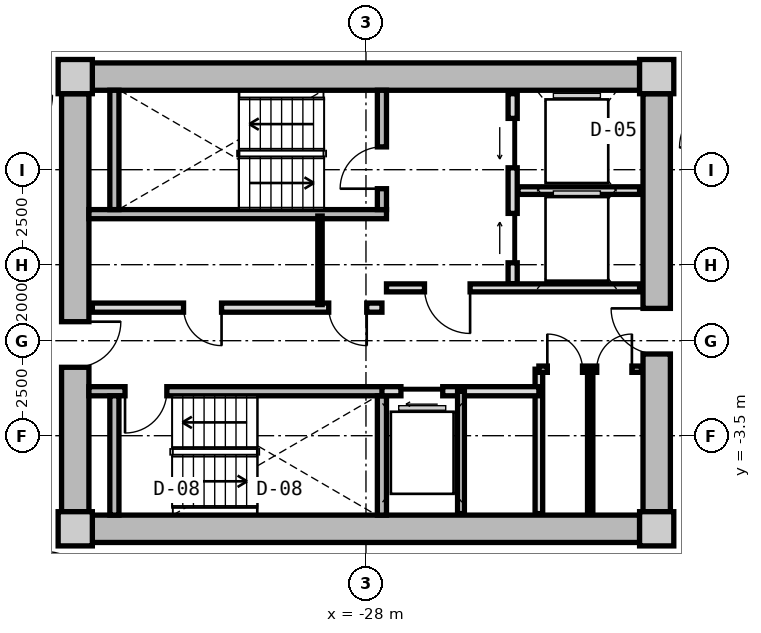
"""IFC4 building model, lengths in metres.
Left out: names, types, materials, properties, quantities, classifications, styles, units other than length and angle.
Written with IfcOpenShell. Run it as: python <this file> out.ifc"""

import sys

from ifc_helpers import new_model, si_unit, direction, frame, frame_2d, origin, origin_2d, place, context, subcontext, project, spatial, rectangle, extrude, source, transform, mapped, element, fill, save


model = new_model("IFC4")
c1 = context("Model", 3, precision=1e-05, world=origin(), true_north=direction((0.0, 1.0)))
c2 = subcontext(c1, "Body", "Model", "MODEL_VIEW")
j1 = project(units=[si_unit("LENGTHUNIT", "METRE"), si_unit("PLANEANGLEUNIT", "RADIAN")], contexts=[c1])
p1 = place(None, origin())
s1 = spatial("IfcSite", under=j1, at=p1, CompositionType="ELEMENT")
p2 = place(p1, origin())
s2 = spatial("IfcBuilding", under=s1, at=p2, CompositionType="ELEMENT")
p3 = place(p2, frame((0.0, 0.0, 105.4)))
s3 = spatial("IfcBuildingStorey", under=s2, at=p3, CompositionType="ELEMENT", Elevation=105.4)
m1 = source(origin(), c2, "Body", "SweptSolid", [
    extrude(rectangle(XDim=0.9, YDim=0.9, at=origin_2d()), origin(), (0.0, 0.0, 1.0), 3.05),
])
for number, where, z_axis, x_axis in (
    (1, (-35.65, -5.95, 0.0), (0.0, 0.0, 1.0), (1.0, 0.0, 0.0)),
    (2, (-20.35, -5.95, 0.0), (0.0, 0.0, 1.0), (1.0, 0.0, 0.0)),
    (3, (-20.35, 5.95, 0.0), (0.0, 0.0, 1.0), (1.0, 0.0, 0.0)),
    (4, (-35.65, 5.95, 0.0), (0.0, 0.0, 1.0), (1.0, 0.0, 0.0)),
):
    element("IfcColumn", number, at=place(p3, frame(where, z_axis=z_axis, x_axis=x_axis)), inside=s3, PredefinedType="COLUMN", context=c2, shape_type="MappedRepresentation", body=[
        mapped(m1, transform((0.0, 0.0, 0.0), x_axis=(1.0, 0.0, 0.0), y_axis=(0.0, 1.0, 0.0), z_axis=(0.0, 0.0, 1.0), scale=1.0)),
    ])
m2 = source(origin(), c2, "Body", "SweptSolid", [
    extrude(rectangle(XDim=14.4, YDim=0.72, at=frame_2d((7.2, 0.0))), origin(), (0.0, 0.0, 1.0), 2.79),
])
for number, where, z_axis, x_axis in (
    (5, (-35.2, 5.95, 0.0), (0.0, 0.0, 1.0), (1.0, 0.0, 0.0)),
    (6, (-20.8, -5.95, 0.0), (0.0, 0.0, 1.0), (-1.0, 0.0, 0.0)),
):
    element("IfcWall", number, at=place(p3, frame(where, z_axis=z_axis, x_axis=x_axis)), inside=s3, PredefinedType="SHEAR", context=c2, shape_type="MappedRepresentation", body=[
        mapped(m2, transform((0.0, 0.0, 0.0), x_axis=(1.0, 0.0, 0.0), y_axis=(0.0, 1.0, 0.0), z_axis=(0.0, 0.0, 1.0), scale=1.0)),
    ])
m3 = source(origin(), c2, "Body", "SweptSolid", [
    extrude(rectangle(XDim=11.0, YDim=0.72, at=frame_2d((5.5, 0.0))), origin(), (0.0, 0.0, 1.0), 2.79),
])
p4 = place(p3, frame((-35.65, -5.5, 0.0), z_axis=(0.0, 0.0, 1.0), x_axis=(0.0, 1.0, 0.0)))
e7 = element("IfcWall", 7, at=p4, inside=s3, PredefinedType="SHEAR", context=c2, shape_type="MappedRepresentation", body=[
    mapped(m3, transform((0.0, 0.0, 0.0), x_axis=(1.0, 0.0, 0.0), y_axis=(0.0, 1.0, 0.0), z_axis=(0.0, 0.0, 1.0), scale=1.0)),
])
p5 = place(p4, frame((3.8, 0.0, 0.0)))
e8 = element("IfcOpeningElement", 8, at=p5, cuts=e7, PredefinedType="OPENING", context=c2, shape_type="SweptSolid", body=[
    extrude(rectangle(XDim=1.2, YDim=2.15, at=frame_2d((0.6, 1.075))), frame((0.0, 0.37, 0.0), z_axis=(0.0, -1.0, 0.0), x_axis=(1.0, 0.0, 0.0)), (0.0, 0.0, 1.0), 0.74),
])
p6 = place(p3, frame((-20.35, 5.5, 0.0), z_axis=(0.0, 0.0, 1.0), x_axis=(0.0, -1.0, 0.0)))
e9 = element("IfcWall", 9, at=p6, inside=s3, PredefinedType="SHEAR", context=c2, shape_type="MappedRepresentation", body=[
    mapped(m3, transform((0.0, 0.0, 0.0), x_axis=(1.0, 0.0, 0.0), y_axis=(0.0, 1.0, 0.0), z_axis=(0.0, 0.0, 1.0), scale=1.0)),
])
p7 = place(p6, frame((5.65, 0.0, 0.0)))
e10 = element("IfcOpeningElement", 10, at=p7, cuts=e9, PredefinedType="OPENING", context=c2, shape_type="SweptSolid", body=[
    extrude(rectangle(XDim=1.2, YDim=2.15, at=frame_2d((0.6, 1.075))), frame((0.0, 0.37, 0.0), z_axis=(0.0, -1.0, 0.0), x_axis=(1.0, 0.0, 0.0)), (0.0, 0.0, 1.0), 0.74),
])
m4 = source(origin(), c2, "Body", "SweptSolid", [
    extrude(rectangle(XDim=7.83, YDim=0.24, at=frame_2d((3.915, 0.0))), origin(), (0.0, 0.0, 1.0), 2.79),
])
p8 = place(p3, frame((-35.29, 2.33, 0.0), z_axis=(0.0, 0.0, 1.0), x_axis=(1.0, 0.0, 0.0)))
e11 = element("IfcWall", 11, at=p8, inside=s3, PredefinedType="PARTITIONING", context=c2, shape_type="MappedRepresentation", body=[
    mapped(m4, transform((0.0, 0.0, 0.0), x_axis=(1.0, 0.0, 0.0), y_axis=(0.0, 1.0, 0.0), z_axis=(0.0, 0.0, 1.0), scale=1.0)),
])
m5 = source(origin(), c2, "Body", "SweptSolid", [
    extrude(rectangle(XDim=3.14, YDim=0.24, at=frame_2d((1.57, 0.0))), origin(), (0.0, 0.0, 1.0), 2.79),
])
p9 = place(p3, frame((-34.62, 2.45, 0.0), z_axis=(0.0, 0.0, 1.0), x_axis=(0.0, 1.0, 0.0)))
e12 = element("IfcWall", 12, at=p9, inside=s3, PredefinedType="PARTITIONING", context=c2, shape_type="MappedRepresentation", body=[
    mapped(m5, transform((0.0, 0.0, 0.0), x_axis=(1.0, 0.0, 0.0), y_axis=(0.0, 1.0, 0.0), z_axis=(0.0, 0.0, 1.0), scale=1.0)),
])
p10 = place(p3, frame((-27.58, 2.45, 0.0), z_axis=(0.0, 0.0, 1.0), x_axis=(0.0, 1.0, 0.0)))
e13 = element("IfcWall", 13, at=p10, inside=s3, PredefinedType="PARTITIONING", context=c2, shape_type="MappedRepresentation", body=[
    mapped(m5, transform((0.0, 0.0, 0.0), x_axis=(1.0, 0.0, 0.0), y_axis=(0.0, 1.0, 0.0), z_axis=(0.0, 0.0, 1.0), scale=1.0)),
])
p11 = place(p10, frame((0.55, 0.0, 0.0)))
e14 = element("IfcOpeningElement", 14, at=p11, cuts=e13, PredefinedType="OPENING", context=c2, shape_type="SweptSolid", body=[
    extrude(rectangle(XDim=1.1, YDim=2.15, at=frame_2d((0.55, 1.075))), frame((0.0, 0.13, 0.0), z_axis=(0.0, -1.0, 0.0), x_axis=(1.0, 0.0, 0.0)), (0.0, 0.0, 1.0), 0.26),
])
p12 = place(p3, frame((-35.29, -2.33, 0.0), z_axis=(0.0, 0.0, 1.0), x_axis=(1.0, 0.0, 0.0)))
e15 = element("IfcWall", 15, at=p12, inside=s3, PredefinedType="PARTITIONING", context=c2, shape_type="MappedRepresentation", body=[
    mapped(m4, transform((0.0, 0.0, 0.0), x_axis=(1.0, 0.0, 0.0), y_axis=(0.0, 1.0, 0.0), z_axis=(0.0, 0.0, 1.0), scale=1.0)),
])
p13 = place(p12, frame((0.95, 0.0, 0.0)))
e16 = element("IfcOpeningElement", 16, at=p13, cuts=e15, PredefinedType="OPENING", context=c2, shape_type="SweptSolid", body=[
    extrude(rectangle(XDim=1.1, YDim=2.15, at=frame_2d((0.55, 1.075))), frame((0.0, 0.13, 0.0), z_axis=(0.0, -1.0, 0.0), x_axis=(1.0, 0.0, 0.0)), (0.0, 0.0, 1.0), 0.26),
])
for number, where, z_axis, x_axis in (
    (17, (-34.62, -5.59, 0.0), (0.0, 0.0, 1.0), (0.0, 1.0, 0.0)),
    (18, (-27.58, -5.59, 0.0), (0.0, 0.0, 1.0), (0.0, 1.0, 0.0)),
):
    element("IfcWall", number, at=place(p3, frame(where, z_axis=z_axis, x_axis=x_axis)), inside=s3, PredefinedType="PARTITIONING", context=c2, shape_type="MappedRepresentation", body=[
        mapped(m5, transform((0.0, 0.0, 0.0), x_axis=(1.0, 0.0, 0.0), y_axis=(0.0, 1.0, 0.0), z_axis=(0.0, 0.0, 1.0), scale=1.0)),
    ])
m6 = source(origin(), c2, "Body", "SweptSolid", [
    extrude(rectangle(XDim=5.0, YDim=0.24, at=frame_2d((2.5, 0.0))), origin(), (0.0, 0.0, 1.0), 2.775),
])
p14 = place(p3, frame((-24.14, 0.5, 0.0), z_axis=(0.0, 0.0, 1.0), x_axis=(0.0, 1.0, 0.0)))
e19 = element("IfcWall", 19, at=p14, inside=s3, PredefinedType="PARTITIONING", context=c2, shape_type="MappedRepresentation", body=[
    mapped(m6, transform((0.0, 0.0, 0.0), x_axis=(1.0, 0.0, 0.0), y_axis=(0.0, 1.0, 0.0), z_axis=(0.0, 0.0, 1.0), scale=1.0)),
])
p15 = place(p14, frame((3.05, 0.0, 0.0)))
e20 = element("IfcOpeningElement", 20, at=p15, cuts=e19, PredefinedType="OPENING", context=c2, shape_type="SweptSolid", body=[
    extrude(rectangle(XDim=1.3, YDim=2.2, at=frame_2d((0.65, 1.1))), frame((0.0, 0.13, 0.0), z_axis=(0.0, -1.0, 0.0), x_axis=(1.0, 0.0, 0.0)), (0.0, 0.0, 1.0), 0.26),
])
p16 = place(p14, frame((0.55, 0.0, 0.0)))
e21 = element("IfcOpeningElement", 21, at=p16, cuts=e19, PredefinedType="OPENING", context=c2, shape_type="SweptSolid", body=[
    extrude(rectangle(XDim=1.3, YDim=2.2, at=frame_2d((0.65, 1.1))), frame((0.0, 0.13, 0.0), z_axis=(0.0, -1.0, 0.0), x_axis=(1.0, 0.0, 0.0)), (0.0, 0.0, 1.0), 0.26),
])
m7 = source(origin(), c2, "Body", "SweptSolid", [
    extrude(rectangle(XDim=3.2, YDim=0.2, at=frame_2d((1.6, 0.0))), origin(), (0.0, 0.0, 1.0), 2.775),
])
p17 = place(p3, frame((-24.0, 2.95, 0.0), z_axis=(0.0, 0.0, 1.0), x_axis=(1.0, 0.0, 0.0)))
e22 = element("IfcWall", 22, at=p17, inside=s3, PredefinedType="PARTITIONING", context=c2, shape_type="MappedRepresentation", body=[
    mapped(m7, transform((0.0, 0.0, 0.0), x_axis=(1.0, 0.0, 0.0), y_axis=(0.0, 1.0, 0.0), z_axis=(0.0, 0.0, 1.0), scale=1.0)),
])
m8 = source(origin(), c2, "Body", "SweptSolid", [
    extrude(rectangle(XDim=6.66, YDim=0.21, at=frame_2d((3.33, 0.0))), origin(), (0.0, 0.0, 1.0), 2.775),
])
p18 = place(p3, frame((-27.46, 0.39, 0.0), z_axis=(0.0, 0.0, 1.0), x_axis=(1.0, 0.0, 0.0)))
e23 = element("IfcWall", 23, at=p18, inside=s3, PredefinedType="PARTITIONING", context=c2, shape_type="MappedRepresentation", body=[
    mapped(m8, transform((0.0, 0.0, 0.0), x_axis=(1.0, 0.0, 0.0), y_axis=(0.0, 1.0, 0.0), z_axis=(0.0, 0.0, 1.0), scale=1.0)),
])
p19 = place(p18, frame((1.0, 0.0, 0.0)))
e24 = element("IfcOpeningElement", 24, at=p19, cuts=e23, PredefinedType="OPENING", context=c2, shape_type="SweptSolid", body=[
    extrude(rectangle(XDim=1.2, YDim=2.15, at=frame_2d((0.6, 1.075))), frame((0.0, 0.115, 0.0), z_axis=(0.0, -1.0, 0.0), x_axis=(1.0, 0.0, 0.0)), (0.0, 0.0, 1.0), 0.23),
])
m9 = source(origin(), c2, "Body", "SweptSolid", [
    extrude(rectangle(XDim=7.62, YDim=0.24, at=frame_2d((3.81, 0.0))), origin(), (0.0, 0.0, 1.0), 2.775),
])
p20 = place(p3, frame((-35.2, -0.13, 0.0), z_axis=(0.0, 0.0, 1.0), x_axis=(1.0, 0.0, 0.0)))
e25 = element("IfcWall", 25, at=p20, inside=s3, PredefinedType="PARTITIONING", context=c2, shape_type="MappedRepresentation", body=[
    mapped(m9, transform((0.0, 0.0, 0.0), x_axis=(1.0, 0.0, 0.0), y_axis=(0.0, 1.0, 0.0), z_axis=(0.0, 0.0, 1.0), scale=1.0)),
])
p21 = place(p20, frame((6.22, 0.0, 0.0)))
e26 = element("IfcOpeningElement", 26, at=p21, cuts=e25, PredefinedType="OPENING", context=c2, shape_type="SweptSolid", body=[
    extrude(rectangle(XDim=1.0, YDim=2.1, at=frame_2d((0.5, 1.05))), frame((0.0, 0.13, 0.0), z_axis=(0.0, -1.0, 0.0), x_axis=(1.0, 0.0, 0.0)), (0.0, 0.0, 1.0), 0.26),
])
p22 = place(p20, frame((2.4, 0.0, 0.0)))
e27 = element("IfcOpeningElement", 27, at=p22, cuts=e25, PredefinedType="OPENING", context=c2, shape_type="SweptSolid", body=[
    extrude(rectangle(XDim=1.0, YDim=2.1, at=frame_2d((0.5, 1.05))), frame((0.0, 0.13, 0.0), z_axis=(0.0, -1.0, 0.0), x_axis=(1.0, 0.0, 0.0)), (0.0, 0.0, 1.0), 0.26),
])
m10 = source(origin(), c2, "Body", "SweptSolid", [
    extrude(rectangle(XDim=2.33, YDim=0.115, at=frame_2d((1.165, 0.0))), origin(), (0.0, 0.0, 1.0), 2.775),
])
p23 = place(p3, frame((-29.21, -0.05, 0.0), z_axis=(0.0, 0.0, 1.0), x_axis=(0.0, 1.0, 0.0)))
e28 = element("IfcWall", 28, at=p23, inside=s3, PredefinedType="PARTITIONING", context=c2, shape_type="MappedRepresentation", body=[
    mapped(m10, transform((0.0, 0.0, 0.0), x_axis=(1.0, 0.0, 0.0), y_axis=(0.0, 1.0, 0.0), z_axis=(0.0, 0.0, 1.0), scale=1.0)),
])
m11 = source(origin(), c2, "Body", "SweptSolid", [
    extrude(rectangle(XDim=3.8, YDim=0.2, at=frame_2d((1.9, 0.0))), origin(), (0.0, 0.0, 1.0), 2.775),
])
p24 = place(p3, frame((-23.45, -5.55, 0.0), z_axis=(0.0, 0.0, 1.0), x_axis=(0.0, 1.0, 0.0)))
e29 = element("IfcWall", 29, at=p24, inside=s3, PredefinedType="PARTITIONING", context=c2, shape_type="MappedRepresentation", body=[
    mapped(m11, transform((0.0, 0.0, 0.0), x_axis=(1.0, 0.0, 0.0), y_axis=(0.0, 1.0, 0.0), z_axis=(0.0, 0.0, 1.0), scale=1.0)),
])
m12 = source(origin(), c2, "Body", "SweptSolid", [
    extrude(rectangle(XDim=4.13, YDim=0.24, at=frame_2d((2.065, 0.0))), origin(), (0.0, 0.0, 1.0), 2.775),
])
p25 = place(p3, frame((-27.58, -2.33, 0.0), z_axis=(0.0, 0.0, 1.0), x_axis=(1.0, 0.0, 0.0)))
e30 = element("IfcWall", 30, at=p25, inside=s3, PredefinedType="PARTITIONING", context=c2, shape_type="MappedRepresentation", body=[
    mapped(m12, transform((0.0, 0.0, 0.0), x_axis=(1.0, 0.0, 0.0), y_axis=(0.0, 1.0, 0.0), z_axis=(0.0, 0.0, 1.0), scale=1.0)),
])
p26 = place(p25, frame((0.5, 0.0, 0.0)))
e31 = element("IfcOpeningElement", 31, at=p26, cuts=e30, PredefinedType="OPENING", context=c2, shape_type="SweptSolid", body=[
    extrude(rectangle(XDim=1.1, YDim=2.2, at=frame_2d((0.55, 1.1))), frame((0.0, 0.13, 0.0), z_axis=(0.0, -1.0, 0.0), x_axis=(1.0, 0.0, 0.0)), (0.0, 0.0, 1.0), 0.26),
])
m13 = source(origin(), c2, "Body", "SweptSolid", [
    extrude(rectangle(XDim=3.22, YDim=0.18, at=frame_2d((1.61, 0.0))), origin(), (0.0, 0.0, 1.0), 2.775),
])
p27 = place(p3, frame((-25.5, -5.55, 0.0), z_axis=(0.0, 0.0, 1.0), x_axis=(0.0, 1.0, 0.0)))
e32 = element("IfcWall", 32, at=p27, inside=s3, PredefinedType="PARTITIONING", context=c2, shape_type="MappedRepresentation", body=[
    mapped(m13, transform((0.0, 0.0, 0.0), x_axis=(1.0, 0.0, 0.0), y_axis=(0.0, 1.0, 0.0), z_axis=(0.0, 0.0, 1.0), scale=1.0)),
])
m14 = source(origin(), c2, "Body", "SweptSolid", [
    extrude(rectangle(XDim=2.7, YDim=0.165, at=frame_2d((1.35, 0.0))), origin(), (0.0, 0.0, 1.0), 2.775),
])
p28 = place(p3, frame((-23.45, -1.75, 0.0), z_axis=(0.0, 0.0, 1.0), x_axis=(1.0, 0.0, 0.0)))
e33 = element("IfcWall", 33, at=p28, inside=s3, PredefinedType="PARTITIONING", context=c2, shape_type="MappedRepresentation", body=[
    mapped(m14, transform((0.0, 0.0, 0.0), x_axis=(1.0, 0.0, 0.0), y_axis=(0.0, 1.0, 0.0), z_axis=(0.0, 0.0, 1.0), scale=1.0)),
])
p29 = place(p28, frame((0.222, 0.0, 0.0)))
e34 = element("IfcOpeningElement", 34, at=p29, cuts=e33, PredefinedType="OPENING", context=c2, shape_type="SweptSolid", body=[
    extrude(rectangle(XDim=0.925, YDim=2.1, at=frame_2d((0.462, 1.05))), frame((0.0, 0.093, 0.0), z_axis=(0.0, -1.0, 0.0), x_axis=(1.0, 0.0, 0.0)), (0.0, 0.0, 1.0), 0.185),
])
p30 = place(p28, frame((1.522, 0.0, 0.0)))
e35 = element("IfcOpeningElement", 35, at=p30, cuts=e33, PredefinedType="OPENING", context=c2, shape_type="SweptSolid", body=[
    extrude(rectangle(XDim=0.925, YDim=2.1, at=frame_2d((0.462, 1.05))), frame((0.0, 0.093, 0.0), z_axis=(0.0, -1.0, 0.0), x_axis=(1.0, 0.0, 0.0)), (0.0, 0.0, 1.0), 0.185),
])
m15 = source(origin(), c2, "Body", "SweptSolid", [
    extrude(rectangle(XDim=3.8, YDim=0.14, at=frame_2d((1.9, 0.0))), origin(), (0.0, 0.0, 1.0), 2.775),
])
p31 = place(p3, frame((-22.1, -5.55, 0.0), z_axis=(0.0, 0.0, 1.0), x_axis=(0.0, 1.0, 0.0)))
e36 = element("IfcWall", 36, at=p31, inside=s3, PredefinedType="PARTITIONING", context=c2, shape_type="MappedRepresentation", body=[
    mapped(m15, transform((0.0, 0.0, 0.0), x_axis=(1.0, 0.0, 0.0), y_axis=(0.0, 1.0, 0.0), z_axis=(0.0, 0.0, 1.0), scale=1.0)),
])
m16 = source(origin(), c2, "Body", "SweptSolid", [
    extrude(rectangle(XDim=1.1, YDim=2.15, at=frame_2d((0.55, 1.075))), frame((0.0, 0.025, 0.0), z_axis=(0.0, -1.0, 0.0), x_axis=(1.0, 0.0, 0.0)), (0.0, 0.0, 1.0), 0.05),
])
p32 = place(p11, origin())
e37 = element("IfcDoor", 37, at=p32, inside=s3, OperationType="SINGLE_SWING_LEFT", PredefinedType="DOOR", context=c2, shape_type="MappedRepresentation", body=[
    mapped(m16, transform((0.0, 0.0, 0.0), x_axis=(1.0, 0.0, 0.0), y_axis=(0.0, 1.0, 0.0), z_axis=(0.0, 0.0, 1.0), scale=1.0)),
])
fill(e14, e37)
p33 = place(p13, frame((1.1, 0.0, 0.0), z_axis=(0.0, 0.0, 1.0), x_axis=(-1.0, 0.0, 0.0)))
e38 = element("IfcDoor", 38, at=p33, inside=s3, OperationType="SINGLE_SWING_RIGHT", PredefinedType="DOOR", context=c2, shape_type="MappedRepresentation", body=[
    mapped(m16, transform((0.0, 0.0, 0.0), x_axis=(1.0, 0.0, 0.0), y_axis=(0.0, 1.0, 0.0), z_axis=(0.0, 0.0, 1.0), scale=1.0)),
])
fill(e16, e38)
m17 = source(origin(), c2, "Body", "SweptSolid", [
    extrude(rectangle(XDim=1.3, YDim=2.2, at=frame_2d((0.65, 1.1))), frame((0.0, 0.025, 0.0), z_axis=(0.0, -1.0, 0.0), x_axis=(1.0, 0.0, 0.0)), (0.0, 0.0, 1.0), 0.05),
])
p34 = place(p15, origin())
e39 = element("IfcDoor", 39, at=p34, inside=s3, OperationType="SLIDING_TO_LEFT", PredefinedType="DOOR", context=c2, shape_type="MappedRepresentation", body=[
    mapped(m17, transform((0.0, 0.0, 0.0), x_axis=(1.0, 0.0, 0.0), y_axis=(0.0, 1.0, 0.0), z_axis=(0.0, 0.0, 1.0), scale=1.0)),
])
fill(e20, e39)
p35 = place(p16, origin())
e40 = element("IfcDoor", 40, at=p35, inside=s3, OperationType="SLIDING_TO_RIGHT", PredefinedType="DOOR", context=c2, shape_type="MappedRepresentation", body=[
    mapped(m17, transform((0.0, 0.0, 0.0), x_axis=(1.0, 0.0, 0.0), y_axis=(0.0, 1.0, 0.0), z_axis=(0.0, 0.0, 1.0), scale=1.0)),
])
fill(e21, e40)
m18 = source(origin(), c2, "Body", "SweptSolid", [
    extrude(rectangle(XDim=1.2, YDim=2.15, at=frame_2d((0.6, 1.075))), frame((0.0, 0.025, 0.0), z_axis=(0.0, -1.0, 0.0), x_axis=(1.0, 0.0, 0.0)), (0.0, 0.0, 1.0), 0.05),
])
p36 = place(p19, frame((1.2, 0.0, 0.0), z_axis=(0.0, 0.0, 1.0), x_axis=(-1.0, 0.0, 0.0)))
e41 = element("IfcDoor", 41, at=p36, inside=s3, OperationType="SINGLE_SWING_LEFT", PredefinedType="DOOR", context=c2, shape_type="MappedRepresentation", body=[
    mapped(m18, transform((0.0, 0.0, 0.0), x_axis=(1.0, 0.0, 0.0), y_axis=(0.0, 1.0, 0.0), z_axis=(0.0, 0.0, 1.0), scale=1.0)),
])
fill(e24, e41)
p37 = place(p5, frame((1.2, 0.0, 0.0), z_axis=(0.0, 0.0, 1.0), x_axis=(-1.0, 0.0, 0.0)))
e42 = element("IfcDoor", 42, at=p37, inside=s3, OperationType="SINGLE_SWING_LEFT", PredefinedType="DOOR", context=c2, shape_type="MappedRepresentation", body=[
    mapped(m18, transform((0.0, 0.0, 0.0), x_axis=(1.0, 0.0, 0.0), y_axis=(0.0, 1.0, 0.0), z_axis=(0.0, 0.0, 1.0), scale=1.0)),
])
fill(e8, e42)
p38 = place(p7, frame((1.2, 0.0, 0.0), z_axis=(0.0, 0.0, 1.0), x_axis=(-1.0, 0.0, 0.0)))
e43 = element("IfcDoor", 43, at=p38, inside=s3, OperationType="SINGLE_SWING_RIGHT", PredefinedType="DOOR", context=c2, shape_type="MappedRepresentation", body=[
    mapped(m18, transform((0.0, 0.0, 0.0), x_axis=(1.0, 0.0, 0.0), y_axis=(0.0, 1.0, 0.0), z_axis=(0.0, 0.0, 1.0), scale=1.0)),
])
fill(e10, e43)
m19 = source(origin(), c2, "Body", "SweptSolid", [
    extrude(rectangle(XDim=1.0, YDim=2.1, at=frame_2d((0.5, 1.05))), frame((0.0, 0.025, 0.0), z_axis=(0.0, -1.0, 0.0), x_axis=(1.0, 0.0, 0.0)), (0.0, 0.0, 1.0), 0.05),
])
p39 = place(p21, frame((1.0, 0.0, 0.0), z_axis=(0.0, 0.0, 1.0), x_axis=(-1.0, 0.0, 0.0)))
e44 = element("IfcDoor", 44, at=p39, inside=s3, OperationType="SINGLE_SWING_LEFT", PredefinedType="DOOR", context=c2, shape_type="MappedRepresentation", body=[
    mapped(m19, transform((0.0, 0.0, 0.0), x_axis=(1.0, 0.0, 0.0), y_axis=(0.0, 1.0, 0.0), z_axis=(0.0, 0.0, 1.0), scale=1.0)),
])
fill(e26, e44)
p40 = place(p22, frame((1.0, 0.0, 0.0), z_axis=(0.0, 0.0, 1.0), x_axis=(-1.0, 0.0, 0.0)))
e45 = element("IfcDoor", 45, at=p40, inside=s3, OperationType="SINGLE_SWING_LEFT", PredefinedType="DOOR", context=c2, shape_type="MappedRepresentation", body=[
    mapped(m19, transform((0.0, 0.0, 0.0), x_axis=(1.0, 0.0, 0.0), y_axis=(0.0, 1.0, 0.0), z_axis=(0.0, 0.0, 1.0), scale=1.0)),
])
fill(e27, e45)
m20 = source(origin(), c2, "Body", "SweptSolid", [
    extrude(rectangle(XDim=1.1, YDim=2.2, at=frame_2d((0.55, 1.1))), frame((0.0, 0.025, 0.0), z_axis=(0.0, -1.0, 0.0), x_axis=(1.0, 0.0, 0.0)), (0.0, 0.0, 1.0), 0.05),
])
p41 = place(p26, frame((1.1, 0.0, 0.0), z_axis=(0.0, 0.0, 1.0), x_axis=(-1.0, 0.0, 0.0)))
e46 = element("IfcDoor", 46, at=p41, inside=s3, OperationType="SLIDING_TO_LEFT", PredefinedType="DOOR", context=c2, shape_type="MappedRepresentation", body=[
    mapped(m20, transform((0.0, 0.0, 0.0), x_axis=(1.0, 0.0, 0.0), y_axis=(0.0, 1.0, 0.0), z_axis=(0.0, 0.0, 1.0), scale=1.0)),
])
fill(e31, e46)
m21 = source(origin(), c2, "Body", "SweptSolid", [
    extrude(rectangle(XDim=0.925, YDim=2.1, at=frame_2d((0.462, 1.05))), frame((0.0, 0.025, 0.0), z_axis=(0.0, -1.0, 0.0), x_axis=(1.0, 0.0, 0.0)), (0.0, 0.0, 1.0), 0.05),
])
p42 = place(p29, origin())
e47 = element("IfcDoor", 47, at=p42, inside=s3, OperationType="SINGLE_SWING_LEFT", PredefinedType="DOOR", context=c2, shape_type="MappedRepresentation", body=[
    mapped(m21, transform((0.0, 0.0, 0.0), x_axis=(1.0, 0.0, 0.0), y_axis=(0.0, 1.0, 0.0), z_axis=(0.0, 0.0, 1.0), scale=1.0)),
])
fill(e34, e47)
p43 = place(p30, origin())
e48 = element("IfcDoor", 48, at=p43, inside=s3, OperationType="SINGLE_SWING_RIGHT", PredefinedType="DOOR", context=c2, shape_type="MappedRepresentation", body=[
    mapped(m21, transform((0.0, 0.0, 0.0), x_axis=(1.0, 0.0, 0.0), y_axis=(0.0, 1.0, 0.0), z_axis=(0.0, 0.0, 1.0), scale=1.0)),
])
fill(e35, e48)
save(model, sys.argv[1])
